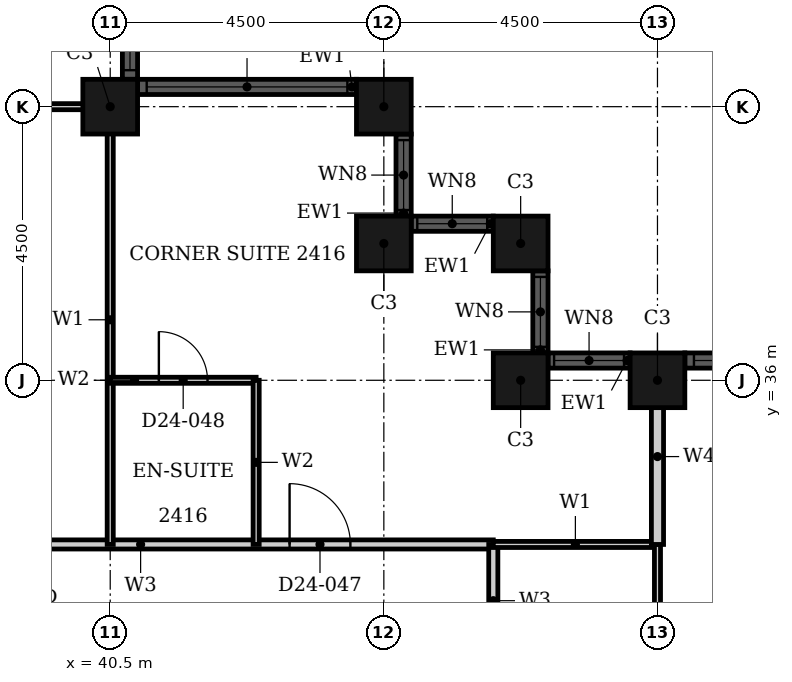
"""IFC4 building model, lengths in metres.
Left out: names, types, materials, properties, quantities, classifications, styles, units other than length and angle.
Written with IfcOpenShell. Run it as: python <this file> out.ifc"""

import sys

from ifc_helpers import new_model, si_unit, direction, frame, frame_2d, origin, origin_2d, place, context, subcontext, project, spatial, rectangle, hollow_rectangle, extrude, element, fill, save


model = new_model("IFC4")
c1 = context("Model", 3, precision=1e-05, world=origin(), true_north=direction((0.0, 1.0)))
c2 = subcontext(c1, "Body", "Model", "MODEL_VIEW")
j1 = project(units=[si_unit("LENGTHUNIT", "METRE"), si_unit("PLANEANGLEUNIT", "RADIAN")], contexts=[c1])
p1 = place(None, origin())
s1 = spatial("IfcSite", under=j1, at=p1, CompositionType="ELEMENT")
p2 = place(p1, origin())
s2 = spatial("IfcBuilding", under=s1, at=p2, CompositionType="ELEMENT")
p3 = place(p2, frame((0.0, 0.0, 100.8)))
s3 = spatial("IfcBuildingStorey", under=s2, at=p3, CompositionType="ELEMENT", Elevation=100.8)
for number, where, z_axis, x_axis in (
    (1, (49.5, 36.0, 0.0), (0.0, 0.0, 1.0), (1.0, 0.0, 0.0)),
    (2, (47.25, 36.0, 0.0), (0.0, 0.0, 1.0), (1.0, 0.0, 0.0)),
    (3, (47.25, 38.25, 0.0), (0.0, 0.0, 1.0), (1.0, 0.0, 0.0)),
    (4, (45.0, 38.25, 0.0), (0.0, 0.0, 1.0), (1.0, 0.0, 0.0)),
    (5, (45.0, 40.5, 0.0), (0.0, 0.0, 1.0), (1.0, 0.0, 0.0)),
    (6, (40.5, 40.5, 0.0), (0.0, 0.0, 1.0), (1.0, 0.0, 0.0)),
):
    element("IfcColumn", number, at=place(p3, frame(where, z_axis=z_axis, x_axis=x_axis)), inside=s3, PredefinedType="COLUMN", context=c2, shape_type="SweptSolid", body=[
        extrude(hollow_rectangle(XDim=0.9, YDim=0.9, WallThickness=0.028, at=origin_2d()), origin(), (0.0, 0.0, 1.0), 3.6),
    ])
p4 = place(p3, frame((58.05, 36.325, 0.0), z_axis=(0.0, 0.0, 1.0), x_axis=(-1.0, 0.0, 0.0)))
e7 = element("IfcWall", 7, at=p4, inside=s3, PredefinedType="SOLIDWALL", context=c2, shape_type="SweptSolid", body=[
    extrude(rectangle(XDim=8.1, YDim=0.25, at=frame_2d((4.05, 0.0))), origin(), (0.0, 0.0, 1.0), 3.6),
])
p5 = place(p4, frame((0.15, 0.0, 0.9)))
e8 = element("IfcOpeningElement", 8, at=p5, cuts=e7, PredefinedType="OPENING", context=c2, shape_type="SweptSolid", body=[
    extrude(rectangle(XDim=3.3, YDim=2.08, at=frame_2d((1.65, 1.04))), frame((0.0, 0.135, 0.0), z_axis=(0.0, -1.0, 0.0), x_axis=(1.0, 0.0, 0.0)), (0.0, 0.0, 1.0), 0.27),
])
p6 = place(p4, frame((4.65, 0.0, 0.9)))
e9 = element("IfcOpeningElement", 9, at=p6, cuts=e7, PredefinedType="OPENING", context=c2, shape_type="SweptSolid", body=[
    extrude(rectangle(XDim=3.3, YDim=2.08, at=frame_2d((1.65, 1.04))), frame((0.0, 0.135, 0.0), z_axis=(0.0, -1.0, 0.0), x_axis=(1.0, 0.0, 0.0)), (0.0, 0.0, 1.0), 0.27),
])
p7 = place(p3, frame((49.05, 36.325, 0.0), z_axis=(0.0, 0.0, 1.0), x_axis=(-1.0, 0.0, 0.0)))
e10 = element("IfcWall", 10, at=p7, inside=s3, PredefinedType="SOLIDWALL", context=c2, shape_type="SweptSolid", body=[
    extrude(rectangle(XDim=1.35, YDim=0.25, at=frame_2d((0.675, 0.0))), origin(), (0.0, 0.0, 1.0), 3.6),
])
p8 = place(p7, frame((0.1, 0.0, 0.9)))
e11 = element("IfcOpeningElement", 11, at=p8, cuts=e10, PredefinedType="OPENING", context=c2, shape_type="SweptSolid", body=[
    extrude(rectangle(XDim=1.15, YDim=2.08, at=frame_2d((0.575, 1.04))), frame((0.0, 0.135, 0.0), z_axis=(0.0, -1.0, 0.0), x_axis=(1.0, 0.0, 0.0)), (0.0, 0.0, 1.0), 0.27),
])
p9 = place(p3, frame((47.575, 36.45, 0.0), z_axis=(0.0, 0.0, 1.0), x_axis=(0.0, 1.0, 0.0)))
e12 = element("IfcWall", 12, at=p9, inside=s3, PredefinedType="SOLIDWALL", context=c2, shape_type="SweptSolid", body=[
    extrude(rectangle(XDim=1.35, YDim=0.25, at=frame_2d((0.675, 0.0))), origin(), (0.0, 0.0, 1.0), 3.6),
])
p10 = place(p9, frame((0.1, 0.0, 0.9)))
e13 = element("IfcOpeningElement", 13, at=p10, cuts=e12, PredefinedType="OPENING", context=c2, shape_type="SweptSolid", body=[
    extrude(rectangle(XDim=1.15, YDim=2.08, at=frame_2d((0.575, 1.04))), frame((0.0, 0.135, 0.0), z_axis=(0.0, -1.0, 0.0), x_axis=(1.0, 0.0, 0.0)), (0.0, 0.0, 1.0), 0.27),
])
p11 = place(p3, frame((46.8, 38.575, 0.0), z_axis=(0.0, 0.0, 1.0), x_axis=(-1.0, 0.0, 0.0)))
e14 = element("IfcWall", 14, at=p11, inside=s3, PredefinedType="SOLIDWALL", context=c2, shape_type="SweptSolid", body=[
    extrude(rectangle(XDim=1.35, YDim=0.25, at=frame_2d((0.675, 0.0))), origin(), (0.0, 0.0, 1.0), 3.6),
])
p12 = place(p11, frame((0.1, 0.0, 0.9)))
e15 = element("IfcOpeningElement", 15, at=p12, cuts=e14, PredefinedType="OPENING", context=c2, shape_type="SweptSolid", body=[
    extrude(rectangle(XDim=1.15, YDim=2.08, at=frame_2d((0.575, 1.04))), frame((0.0, 0.135, 0.0), z_axis=(0.0, -1.0, 0.0), x_axis=(1.0, 0.0, 0.0)), (0.0, 0.0, 1.0), 0.27),
])
p13 = place(p3, frame((45.325, 38.7, 0.0), z_axis=(0.0, 0.0, 1.0), x_axis=(0.0, 1.0, 0.0)))
e16 = element("IfcWall", 16, at=p13, inside=s3, PredefinedType="SOLIDWALL", context=c2, shape_type="SweptSolid", body=[
    extrude(rectangle(XDim=1.35, YDim=0.25, at=frame_2d((0.675, 0.0))), origin(), (0.0, 0.0, 1.0), 3.6),
])
p14 = place(p13, frame((0.1, 0.0, 0.9)))
e17 = element("IfcOpeningElement", 17, at=p14, cuts=e16, PredefinedType="OPENING", context=c2, shape_type="SweptSolid", body=[
    extrude(rectangle(XDim=1.15, YDim=2.08, at=frame_2d((0.575, 1.04))), frame((0.0, 0.135, 0.0), z_axis=(0.0, -1.0, 0.0), x_axis=(1.0, 0.0, 0.0)), (0.0, 0.0, 1.0), 0.27),
])
p15 = place(p3, frame((44.55, 40.825, 0.0), z_axis=(0.0, 0.0, 1.0), x_axis=(-1.0, 0.0, 0.0)))
e18 = element("IfcWall", 18, at=p15, inside=s3, PredefinedType="SOLIDWALL", context=c2, shape_type="SweptSolid", body=[
    extrude(rectangle(XDim=3.6, YDim=0.25, at=frame_2d((1.8, 0.0))), origin(), (0.0, 0.0, 1.0), 3.6),
])
p16 = place(p15, frame((0.15, 0.0, 0.9)))
e19 = element("IfcOpeningElement", 19, at=p16, cuts=e18, PredefinedType="OPENING", context=c2, shape_type="SweptSolid", body=[
    extrude(rectangle(XDim=3.3, YDim=2.08, at=frame_2d((1.65, 1.04))), frame((0.0, 0.135, 0.0), z_axis=(0.0, -1.0, 0.0), x_axis=(1.0, 0.0, 0.0)), (0.0, 0.0, 1.0), 0.27),
])
p17 = place(p3, frame((40.825, 40.95, 0.0), z_axis=(0.0, 0.0, 1.0), x_axis=(0.0, 1.0, 0.0)))
e20 = element("IfcWall", 20, at=p17, inside=s3, PredefinedType="SOLIDWALL", context=c2, shape_type="SweptSolid", body=[
    extrude(rectangle(XDim=8.1, YDim=0.25, at=frame_2d((4.05, 0.0))), origin(), (0.0, 0.0, 1.0), 3.6),
])
p18 = place(p17, frame((0.15, 0.0, 0.9)))
e21 = element("IfcOpeningElement", 21, at=p18, cuts=e20, PredefinedType="OPENING", context=c2, shape_type="SweptSolid", body=[
    extrude(rectangle(XDim=3.3, YDim=2.08, at=frame_2d((1.65, 1.04))), frame((0.0, 0.135, 0.0), z_axis=(0.0, -1.0, 0.0), x_axis=(1.0, 0.0, 0.0)), (0.0, 0.0, 1.0), 0.27),
])
p19 = place(p17, frame((4.65, 0.0, 0.9)))
e22 = element("IfcOpeningElement", 22, at=p19, cuts=e20, PredefinedType="OPENING", context=c2, shape_type="SweptSolid", body=[
    extrude(rectangle(XDim=3.3, YDim=2.08, at=frame_2d((1.65, 1.04))), frame((0.0, 0.135, 0.0), z_axis=(0.0, -1.0, 0.0), x_axis=(1.0, 0.0, 0.0)), (0.0, 0.0, 1.0), 0.27),
])
p20 = place(p3, frame((33.3, 33.3, 0.0), z_axis=(0.0, 0.0, 1.0), x_axis=(1.0, 0.0, 0.0)))
e23 = element("IfcWall", 23, at=p20, inside=s3, PredefinedType="PARTITIONING", context=c2, shape_type="SweptSolid", body=[
    extrude(rectangle(XDim=13.5, YDim=0.15, at=frame_2d((6.75, 0.0))), origin(), (0.0, 0.0, 1.0), 3.3),
])
p21 = place(p20, frame((10.15, 0.0, 0.0)))
e24 = element("IfcOpeningElement", 24, at=p21, cuts=e23, PredefinedType="OPENING", context=c2, shape_type="SweptSolid", body=[
    extrude(rectangle(XDim=1.0, YDim=2.1, at=frame_2d((0.5, 1.05))), frame((0.0, 0.085, 0.0), z_axis=(0.0, -1.0, 0.0), x_axis=(1.0, 0.0, 0.0)), (0.0, 0.0, 1.0), 0.17),
])
p22 = place(p20, frame((0.75, 0.0, 0.0)))
e25 = element("IfcOpeningElement", 25, at=p22, cuts=e23, PredefinedType="OPENING", context=c2, shape_type="SweptSolid", body=[
    extrude(rectangle(XDim=0.9, YDim=2.1, at=frame_2d((0.45, 1.05))), frame((0.0, 0.085, 0.0), z_axis=(0.0, -1.0, 0.0), x_axis=(1.0, 0.0, 0.0)), (0.0, 0.0, 1.0), 0.17),
])
p23 = place(p20, frame((4.35, 0.0, 0.0)))
e26 = element("IfcOpeningElement", 26, at=p23, cuts=e23, PredefinedType="OPENING", context=c2, shape_type="SweptSolid", body=[
    extrude(rectangle(XDim=0.9, YDim=2.1, at=frame_2d((0.45, 1.05))), frame((0.0, 0.085, 0.0), z_axis=(0.0, -1.0, 0.0), x_axis=(1.0, 0.0, 0.0)), (0.0, 0.0, 1.0), 0.17),
])
p24 = place(p3, frame((46.8, 28.8, 0.0), z_axis=(0.0, 0.0, 1.0), x_axis=(0.0, 1.0, 0.0)))
e27 = element("IfcWall", 27, at=p24, inside=s3, PredefinedType="PARTITIONING", context=c2, shape_type="SweptSolid", body=[
    extrude(rectangle(XDim=4.5, YDim=0.15, at=frame_2d((2.25, 0.0))), origin(), (0.0, 0.0, 1.0), 3.3),
])
p25 = place(p24, frame((1.75, 0.0, 0.0)))
e28 = element("IfcOpeningElement", 28, at=p25, cuts=e27, PredefinedType="OPENING", context=c2, shape_type="SweptSolid", body=[
    extrude(rectangle(XDim=0.9, YDim=2.1, at=frame_2d((0.45, 1.05))), frame((0.0, 0.085, 0.0), z_axis=(0.0, -1.0, 0.0), x_axis=(1.0, 0.0, 0.0)), (0.0, 0.0, 1.0), 0.17),
])
p26 = place(p3, frame((46.8, 33.3, 0.0), z_axis=(0.0, 0.0, 1.0), x_axis=(1.0, 0.0, 0.0)))
e29 = element("IfcWall", 29, at=p26, inside=s3, PredefinedType="PARTITIONING", context=c2, shape_type="SweptSolid", body=[
    extrude(rectangle(XDim=2.7, YDim=0.1, at=frame_2d((1.35, 0.0))), origin(), (0.0, 0.0, 1.0), 3.3),
])
p27 = place(p3, frame((33.3, 40.5, 0.0), z_axis=(0.0, 0.0, 1.0), x_axis=(1.0, 0.0, 0.0)))
e30 = element("IfcWall", 30, at=p27, inside=s3, PredefinedType="PARTITIONING", context=c2, shape_type="SweptSolid", body=[
    extrude(rectangle(XDim=7.39, YDim=0.1, at=frame_2d((3.695, 0.0))), origin(), (0.0, 0.0, 1.0), 2.38),
])
p28 = place(p3, frame((40.5, 33.3, 0.0), z_axis=(0.0, 0.0, 1.0), x_axis=(0.0, 1.0, 0.0)))
e31 = element("IfcWall", 31, at=p28, inside=s3, PredefinedType="PARTITIONING", context=c2, shape_type="SweptSolid", body=[
    extrude(rectangle(XDim=7.39, YDim=0.1, at=frame_2d((3.695, 0.0))), origin(), (0.0, 0.0, 1.0), 3.3),
])
p29 = place(p3, frame((49.5, 28.8, 0.0), z_axis=(0.0, 0.0, 1.0), x_axis=(0.0, 1.0, 0.0)))
e32 = element("IfcWall", 32, at=p29, inside=s3, PredefinedType="PARTITIONING", context=c2, shape_type="SweptSolid", body=[
    extrude(rectangle(XDim=4.5, YDim=0.1, at=frame_2d((2.25, 0.0))), origin(), (0.0, 0.0, 1.0), 2.38),
])
p30 = place(p3, frame((49.5, 33.3, 0.0), z_axis=(0.0, 0.0, 1.0), x_axis=(0.0, 1.0, 0.0)))
e33 = element("IfcWall", 33, at=p30, inside=s3, PredefinedType="PARTITIONING", context=c2, shape_type="SweptSolid", body=[
    extrude(rectangle(XDim=2.89, YDim=0.2, at=frame_2d((1.445, 0.0))), origin(), (0.0, 0.0, 1.0), 2.38),
])
p31 = place(p3, frame((40.5, 36.0, 0.0), z_axis=(0.0, 0.0, 1.0), x_axis=(1.0, 0.0, 0.0)))
e34 = element("IfcWall", 34, at=p31, inside=s3, PredefinedType="PARTITIONING", context=c2, shape_type="SweptSolid", body=[
    extrude(rectangle(XDim=2.4, YDim=0.1, at=frame_2d((1.2, 0.0))), origin(), (0.0, 0.0, 1.0), 3.3),
])
p32 = place(p31, frame((0.8, 0.0, 0.0)))
e35 = element("IfcOpeningElement", 35, at=p32, cuts=e34, PredefinedType="OPENING", context=c2, shape_type="SweptSolid", body=[
    extrude(rectangle(XDim=0.8, YDim=2.1, at=frame_2d((0.4, 1.05))), frame((0.0, 0.06, 0.0), z_axis=(0.0, -1.0, 0.0), x_axis=(1.0, 0.0, 0.0)), (0.0, 0.0, 1.0), 0.12),
])
p33 = place(p3, frame((42.9, 33.3, 0.0), z_axis=(0.0, 0.0, 1.0), x_axis=(0.0, 1.0, 0.0)))
e36 = element("IfcWall", 36, at=p33, inside=s3, PredefinedType="PARTITIONING", context=c2, shape_type="SweptSolid", body=[
    extrude(rectangle(XDim=2.7, YDim=0.1, at=frame_2d((1.35, 0.0))), origin(), (0.0, 0.0, 1.0), 3.3),
])
p34 = place(p6, origin())
e37 = element("IfcWindow", 37, at=p34, inside=s3, PartitioningType="SINGLE_PANEL", PredefinedType="WINDOW", context=c2, shape_type="SweptSolid", body=[
    extrude(rectangle(XDim=3.3, YDim=2.08, at=frame_2d((1.65, 1.04))), frame((0.0, 0.03, 0.0), z_axis=(0.0, -1.0, 0.0), x_axis=(1.0, 0.0, 0.0)), (0.0, 0.0, 1.0), 0.06),
])
fill(e9, e37)
p35 = place(p8, origin())
e38 = element("IfcWindow", 38, at=p35, inside=s3, PartitioningType="SINGLE_PANEL", PredefinedType="WINDOW", context=c2, shape_type="SweptSolid", body=[
    extrude(rectangle(XDim=1.15, YDim=2.08, at=frame_2d((0.575, 1.04))), frame((0.0, 0.03, 0.0), z_axis=(0.0, -1.0, 0.0), x_axis=(1.0, 0.0, 0.0)), (0.0, 0.0, 1.0), 0.06),
])
fill(e11, e38)
p36 = place(p10, origin())
e39 = element("IfcWindow", 39, at=p36, inside=s3, PartitioningType="SINGLE_PANEL", PredefinedType="WINDOW", context=c2, shape_type="SweptSolid", body=[
    extrude(rectangle(XDim=1.15, YDim=2.08, at=frame_2d((0.575, 1.04))), frame((0.0, 0.03, 0.0), z_axis=(0.0, -1.0, 0.0), x_axis=(1.0, 0.0, 0.0)), (0.0, 0.0, 1.0), 0.06),
])
fill(e13, e39)
p37 = place(p12, origin())
e40 = element("IfcWindow", 40, at=p37, inside=s3, PartitioningType="SINGLE_PANEL", PredefinedType="WINDOW", context=c2, shape_type="SweptSolid", body=[
    extrude(rectangle(XDim=1.15, YDim=2.08, at=frame_2d((0.575, 1.04))), frame((0.0, 0.03, 0.0), z_axis=(0.0, -1.0, 0.0), x_axis=(1.0, 0.0, 0.0)), (0.0, 0.0, 1.0), 0.06),
])
fill(e15, e40)
p38 = place(p14, origin())
e41 = element("IfcWindow", 41, at=p38, inside=s3, PartitioningType="SINGLE_PANEL", PredefinedType="WINDOW", context=c2, shape_type="SweptSolid", body=[
    extrude(rectangle(XDim=1.15, YDim=2.08, at=frame_2d((0.575, 1.04))), frame((0.0, 0.03, 0.0), z_axis=(0.0, -1.0, 0.0), x_axis=(1.0, 0.0, 0.0)), (0.0, 0.0, 1.0), 0.06),
])
fill(e17, e41)
p39 = place(p16, origin())
e42 = element("IfcWindow", 42, at=p39, inside=s3, PartitioningType="SINGLE_PANEL", PredefinedType="WINDOW", context=c2, shape_type="SweptSolid", body=[
    extrude(rectangle(XDim=3.3, YDim=2.08, at=frame_2d((1.65, 1.04))), frame((0.0, 0.03, 0.0), z_axis=(0.0, -1.0, 0.0), x_axis=(1.0, 0.0, 0.0)), (0.0, 0.0, 1.0), 0.06),
])
fill(e19, e42)
p40 = place(p18, origin())
e43 = element("IfcWindow", 43, at=p40, inside=s3, PartitioningType="SINGLE_PANEL", PredefinedType="WINDOW", context=c2, shape_type="SweptSolid", body=[
    extrude(rectangle(XDim=3.3, YDim=2.08, at=frame_2d((1.65, 1.04))), frame((0.0, 0.03, 0.0), z_axis=(0.0, -1.0, 0.0), x_axis=(1.0, 0.0, 0.0)), (0.0, 0.0, 1.0), 0.06),
])
fill(e21, e43)
p41 = place(p21, origin())
e44 = element("IfcDoor", 44, at=p41, inside=s3, OperationType="SINGLE_SWING_RIGHT", PredefinedType="DOOR", context=c2, shape_type="SweptSolid", body=[
    extrude(rectangle(XDim=1.0, YDim=2.1, at=frame_2d((0.5, 1.05))), frame((0.0, 0.025, 0.0), z_axis=(0.0, -1.0, 0.0), x_axis=(1.0, 0.0, 0.0)), (0.0, 0.0, 1.0), 0.05),
])
fill(e24, e44)
p42 = place(p32, origin())
e45 = element("IfcDoor", 45, at=p42, inside=s3, OperationType="SINGLE_SWING_LEFT", PredefinedType="DOOR", context=c2, shape_type="SweptSolid", body=[
    extrude(rectangle(XDim=0.8, YDim=2.1, at=frame_2d((0.4, 1.05))), frame((0.0, 0.025, 0.0), z_axis=(0.0, -1.0, 0.0), x_axis=(1.0, 0.0, 0.0)), (0.0, 0.0, 1.0), 0.05),
])
fill(e35, e45)
save(model, sys.argv[1])
